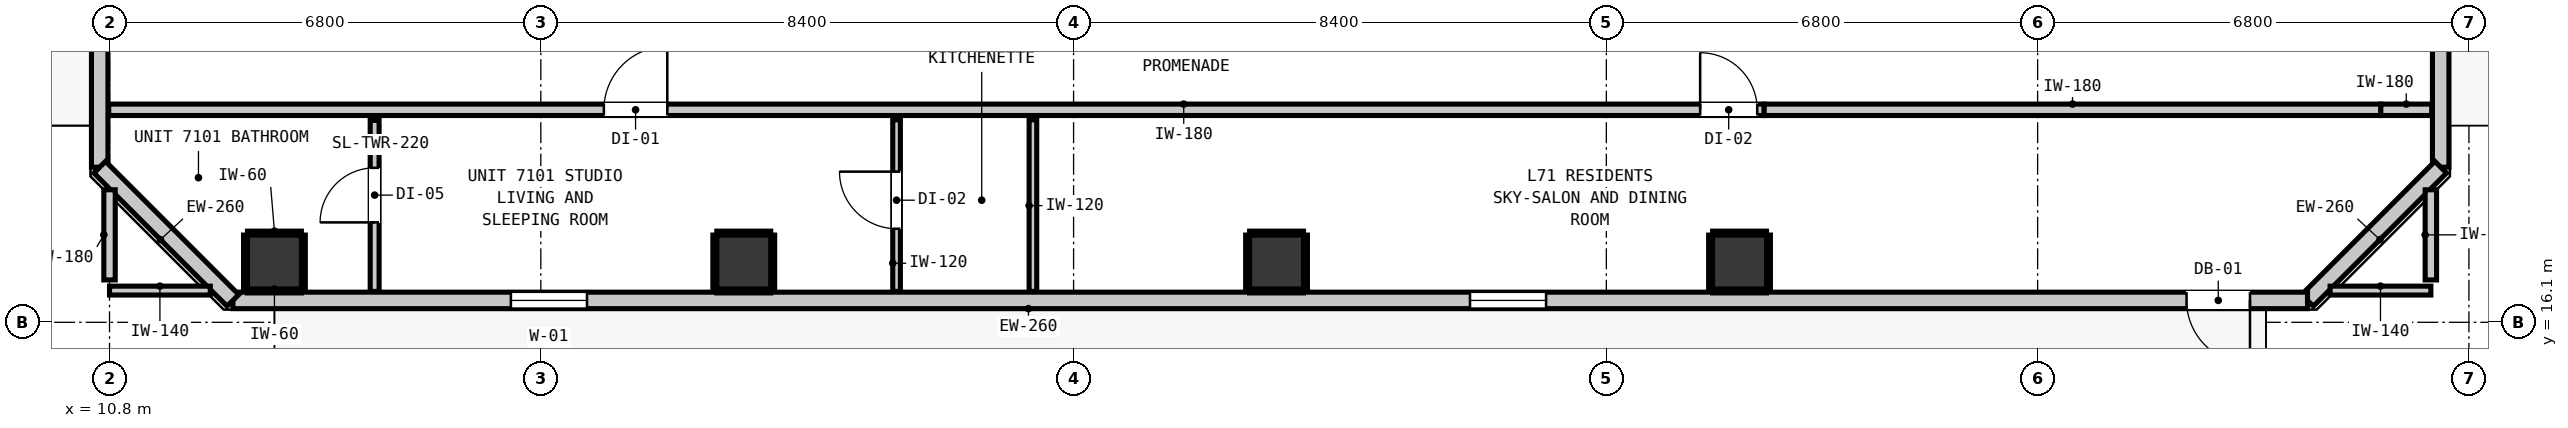
"""IFC4 building model, lengths in metres.
Left out: names, types, materials, properties, quantities, classifications, styles, units other than length and angle.
Written with IfcOpenShell. Run it as: python <this file> out.ifc"""

import sys

from ifc_helpers import new_model, si_unit, direction, frame, frame_2d, origin, origin_2d, place, context, subcontext, project, spatial, rectangle, extrude, element, fill, save


model = new_model("IFC4")
c1 = context("Model", 3, precision=1e-05, world=origin(), true_north=direction((0.0, 1.0)))
c2 = subcontext(c1, "Body", "Model", "MODEL_VIEW")
j1 = project(units=[si_unit("LENGTHUNIT", "METRE"), si_unit("PLANEANGLEUNIT", "RADIAN")], contexts=[c1])
p1 = place(None, origin())
s1 = spatial("IfcSite", under=j1, at=p1, CompositionType="ELEMENT")
p2 = place(p1, origin())
s2 = spatial("IfcBuilding", under=s1, at=p2, CompositionType="ELEMENT")
p3 = place(p2, frame((0.0, 0.0, 244.56)))
s3 = spatial("IfcBuildingStorey", under=s2, at=p3, CompositionType="ELEMENT", Elevation=244.56)
for number, where, z_axis, x_axis in (
    (1, (13.4, 17.05, 0.0), (0.0, 0.0, 1.0), (1.0, 0.0, 0.0)),
    (2, (20.8, 17.05, 0.0), (0.0, 0.0, 1.0), (1.0, 0.0, 0.0)),
    (3, (29.2, 17.05, 0.0), (0.0, 0.0, 1.0), (1.0, 0.0, 0.0)),
    (4, (36.5, 17.05, 0.0), (0.0, 0.0, 1.0), (1.0, 0.0, 0.0)),
):
    element("IfcColumn", number, at=place(p3, frame(where, z_axis=z_axis, x_axis=x_axis)), inside=s3, PredefinedType="COLUMN", context=c2, shape_type="SweptSolid", body=[
        extrude(rectangle(XDim=0.85, YDim=0.85, at=origin_2d()), origin(), (0.0, 0.0, 1.0), 3.32),
    ])
p4 = place(p3, frame((10.645, 18.545, 0.0), z_axis=(0.0, 0.0, 1.0), x_axis=(0.0, 1.0, 0.0)))
e5 = element("IfcWall", 5, at=p4, inside=s3, PredefinedType="STANDARD", context=c2, shape_type="SweptSolid", body=[
    extrude(rectangle(XDim=30.31, YDim=0.26, at=frame_2d((15.155, 0.0))), origin(), (0.0, 0.0, 1.0), 3.1),
])
p5 = place(p4, frame((24.171, 0.0, 0.0)))
e6 = element("IfcOpeningElement", 6, at=p5, cuts=e5, PredefinedType="OPENING", context=c2, shape_type="SweptSolid", body=[
    extrude(rectangle(XDim=1.0, YDim=2.15, at=frame_2d((0.5, 1.075))), frame((0.0, 0.14, 0.0), z_axis=(0.0, -1.0, 0.0), x_axis=(1.0, 0.0, 0.0)), (0.0, 0.0, 1.0), 0.28),
])
p6 = place(p4, frame((27.195, 0.0, 0.85)))
e7 = element("IfcOpeningElement", 7, at=p6, cuts=e5, PredefinedType="OPENING", context=c2, shape_type="SweptSolid", body=[
    extrude(rectangle(XDim=1.2, YDim=1.8, at=frame_2d((0.6, 0.9))), frame((0.0, 0.14, 0.0), z_axis=(0.0, -1.0, 0.0), x_axis=(1.0, 0.0, 0.0)), (0.0, 0.0, 1.0), 0.28),
])
p7 = place(p3, frame((47.555, 48.855, 0.0), z_axis=(0.0, 0.0, 1.0), x_axis=(0.0, -1.0, 0.0)))
e8 = element("IfcWall", 8, at=p7, inside=s3, PredefinedType="STANDARD", context=c2, shape_type="SweptSolid", body=[
    extrude(rectangle(XDim=30.31, YDim=0.26, at=frame_2d((15.155, 0.0))), origin(), (0.0, 0.0, 1.0), 3.1),
])
p8 = place(p7, frame((3.729, 0.0, 0.0)))
e9 = element("IfcOpeningElement", 9, at=p8, cuts=e8, PredefinedType="OPENING", context=c2, shape_type="SweptSolid", body=[
    extrude(rectangle(XDim=1.0, YDim=2.15, at=frame_2d((0.5, 1.075))), frame((0.0, 0.14, 0.0), z_axis=(0.0, -1.0, 0.0), x_axis=(1.0, 0.0, 0.0)), (0.0, 0.0, 1.0), 0.28),
])
p9 = place(p3, frame((47.555, 18.545, 0.0), z_axis=(0.0, 0.0, 1.0), x_axis=(-0.707106781187, -0.707106781187, 0.0)))
e10 = element("IfcWall", 10, at=p9, inside=s3, PredefinedType="STANDARD", context=c2, shape_type="SweptSolid", body=[
    extrude(rectangle(XDim=2.97, YDim=0.26, at=frame_2d((1.485, 0.0))), origin(), (0.0, 0.0, 1.0), 3.1),
])
p10 = place(p3, frame((45.455, 16.445, 0.0), z_axis=(0.0, 0.0, 1.0), x_axis=(-1.0, 0.0, 0.0)))
e11 = element("IfcWall", 11, at=p10, inside=s3, PredefinedType="STANDARD", context=c2, shape_type="SweptSolid", body=[
    extrude(rectangle(XDim=32.71, YDim=0.26, at=frame_2d((16.355, 0.0))), origin(), (0.0, 0.0, 1.0), 3.1),
])
p11 = place(p10, frame((0.907, 0.0, 0.0)))
e12 = element("IfcOpeningElement", 12, at=p11, cuts=e11, PredefinedType="OPENING", context=c2, shape_type="SweptSolid", body=[
    extrude(rectangle(XDim=1.0, YDim=2.15, at=frame_2d((0.5, 1.075))), frame((0.0, 0.14, 0.0), z_axis=(0.0, -1.0, 0.0), x_axis=(1.0, 0.0, 0.0)), (0.0, 0.0, 1.0), 0.28),
])
p12 = place(p10, frame((27.127, 0.0, 0.85)))
e13 = element("IfcOpeningElement", 13, at=p12, cuts=e11, PredefinedType="OPENING", context=c2, shape_type="SweptSolid", body=[
    extrude(rectangle(XDim=1.2, YDim=1.8, at=frame_2d((0.6, 0.9))), frame((0.0, 0.14, 0.0), z_axis=(0.0, -1.0, 0.0), x_axis=(1.0, 0.0, 0.0)), (0.0, 0.0, 1.0), 0.28),
])
p13 = place(p10, frame((12.005, 0.0, 0.85)))
e14 = element("IfcOpeningElement", 14, at=p13, cuts=e11, PredefinedType="OPENING", context=c2, shape_type="SweptSolid", body=[
    extrude(rectangle(XDim=1.2, YDim=1.8, at=frame_2d((0.6, 0.9))), frame((0.0, 0.14, 0.0), z_axis=(0.0, -1.0, 0.0), x_axis=(1.0, 0.0, 0.0)), (0.0, 0.0, 1.0), 0.28),
])
p14 = place(p3, frame((12.745, 16.445, 0.0), z_axis=(0.0, 0.0, 1.0), x_axis=(-0.707147883682, 0.707065676302, 0.0)))
e15 = element("IfcWall", 15, at=p14, inside=s3, PredefinedType="STANDARD", context=c2, shape_type="SweptSolid", body=[
    extrude(rectangle(XDim=2.97, YDim=0.26, at=frame_2d((1.485, 0.0))), origin(), (0.0, 0.0, 1.0), 3.1),
])
p15 = place(p3, frame((10.787, 19.45, 0.0), z_axis=(0.0, 0.0, 1.0), x_axis=(1.0, 0.0, 0.0)))
e16 = element("IfcWall", 16, at=p15, inside=s3, PredefinedType="PARTITIONING", context=c2, shape_type="SweptSolid", body=[
    extrude(rectangle(XDim=26.102, YDim=0.18, at=frame_2d((13.051, 0.0))), origin(), (0.0, 0.0, 1.0), 3.1),
])
p16 = place(p15, frame((7.807, 0.0, 0.0)))
e17 = element("IfcOpeningElement", 17, at=p16, cuts=e16, PredefinedType="OPENING", context=c2, shape_type="SweptSolid", body=[
    extrude(rectangle(XDim=1.0, YDim=2.15, at=frame_2d((0.5, 1.075))), frame((0.0, 0.1, 0.0), z_axis=(0.0, -1.0, 0.0), x_axis=(1.0, 0.0, 0.0)), (0.0, 0.0, 1.0), 0.2),
])
p17 = place(p15, frame((25.092, 0.0, 0.0)))
e18 = element("IfcOpeningElement", 18, at=p17, cuts=e16, PredefinedType="OPENING", context=c2, shape_type="SweptSolid", body=[
    extrude(rectangle(XDim=0.9, YDim=2.1, at=frame_2d((0.45, 1.05))), frame((0.0, 0.1, 0.0), z_axis=(0.0, -1.0, 0.0), x_axis=(1.0, 0.0, 0.0)), (0.0, 0.0, 1.0), 0.2),
])
p18 = place(p3, frame((36.889, 19.45, 0.0), z_axis=(0.0, 0.0, 1.0), x_axis=(1.0, 0.0, 0.0)))
e19 = element("IfcWall", 19, at=p18, inside=s3, PredefinedType="PARTITIONING", context=c2, shape_type="SweptSolid", body=[
    extrude(rectangle(XDim=9.722, YDim=0.18, at=frame_2d((4.861, 0.0))), origin(), (0.0, 0.0, 1.0), 2.477),
])
p19 = place(p3, frame((46.611, 19.45, 0.0), z_axis=(0.0, 0.0, 1.0), x_axis=(1.0, 0.0, 0.0)))
e20 = element("IfcWall", 20, at=p19, inside=s3, PredefinedType="PARTITIONING", context=c2, shape_type="SweptSolid", body=[
    extrude(rectangle(XDim=0.802, YDim=0.18, at=frame_2d((0.401, 0.0))), origin(), (0.0, 0.0, 1.0), 3.1),
])
for number, where, z_axis, x_axis in (
    (21, (10.8, 16.6, 0.0), (0.0, 0.0, 1.0), (1.0, 0.0, 0.0)),
    (22, (45.811, 16.6, 0.0), (0.0, 0.0, 1.0), (1.0, 0.0, 0.0)),
):
    element("IfcWall", number, at=place(p3, frame(where, z_axis=z_axis, x_axis=x_axis)), inside=s3, PredefinedType="PARTITIONING", context=c2, shape_type="SweptSolid", body=[
        extrude(rectangle(XDim=1.589, YDim=0.14, at=frame_2d((0.794, 0.0))), origin(), (0.0, 0.0, 1.0), 3.1),
    ])
for number, where, z_axis, x_axis in (
    (23, (10.8, 16.768, 0.0), (0.0, 0.0, 1.0), (0.0, 1.0, 0.0)),
    (24, (47.4, 16.768, 0.0), (0.0, 0.0, 1.0), (0.0, 1.0, 0.0)),
):
    element("IfcWall", number, at=place(p3, frame(where, z_axis=z_axis, x_axis=x_axis)), inside=s3, PredefinedType="PARTITIONING", context=c2, shape_type="SweptSolid", body=[
        extrude(rectangle(XDim=1.421, YDim=0.18, at=frame_2d((0.71, 0.0))), origin(), (0.0, 0.0, 1.0), 3.1),
    ])
p20 = place(p3, frame((14.98, 16.587, 0.0), z_axis=(0.0, 0.0, 1.0), x_axis=(0.0, 1.0, 0.0)))
e25 = element("IfcWall", 25, at=p20, inside=s3, PredefinedType="PARTITIONING", context=c2, shape_type="SweptSolid", body=[
    extrude(rectangle(XDim=2.695, YDim=0.14, at=frame_2d((1.348, 0.0))), origin(), (0.0, 0.0, 1.0), 3.1),
])
p21 = place(p20, frame((1.088, 0.0, 0.0)))
e26 = element("IfcOpeningElement", 26, at=p21, cuts=e25, PredefinedType="OPENING", context=c2, shape_type="SweptSolid", body=[
    extrude(rectangle(XDim=0.86, YDim=2.02, at=frame_2d((0.43, 1.01))), frame((0.0, 0.08, 0.0), z_axis=(0.0, -1.0, 0.0), x_axis=(1.0, 0.0, 0.0)), (0.0, 0.0, 1.0), 0.16),
])
p22 = place(p3, frame((23.209, 16.587, 0.0), z_axis=(0.0, 0.0, 1.0), x_axis=(0.0, 1.0, 0.0)))
e27 = element("IfcWall", 27, at=p22, inside=s3, PredefinedType="PARTITIONING", context=c2, shape_type="SweptSolid", body=[
    extrude(rectangle(XDim=2.705, YDim=0.12, at=frame_2d((1.353, 0.0))), origin(), (0.0, 0.0, 1.0), 3.1),
])
p23 = place(p22, frame((0.988, 0.0, 0.0)))
e28 = element("IfcOpeningElement", 28, at=p23, cuts=e27, PredefinedType="OPENING", context=c2, shape_type="SweptSolid", body=[
    extrude(rectangle(XDim=0.9, YDim=2.1, at=frame_2d((0.45, 1.05))), frame((0.0, 0.07, 0.0), z_axis=(0.0, -1.0, 0.0), x_axis=(1.0, 0.0, 0.0)), (0.0, 0.0, 1.0), 0.14),
])
p24 = place(p3, frame((25.359, 16.587, 0.0), z_axis=(0.0, 0.0, 1.0), x_axis=(0.0, 1.0, 0.0)))
e29 = element("IfcWall", 29, at=p24, inside=s3, PredefinedType="PARTITIONING", context=c2, shape_type="SweptSolid", body=[
    extrude(rectangle(XDim=2.705, YDim=0.12, at=frame_2d((1.353, 0.0))), origin(), (0.0, 0.0, 1.0), 3.1),
])
for number, where, z_axis, x_axis in (
    (30, (12.975, 16.593, 0.0), (0.0, 0.0, 1.0), (1.0, 0.0, 0.0)),
    (31, (12.975, 17.507, 0.0), (0.0, 0.0, 1.0), (1.0, 0.0, 0.0)),
):
    element("IfcWall", number, at=place(p3, frame(where, z_axis=z_axis, x_axis=x_axis)), inside=s3, PredefinedType="PARTITIONING", context=c2, shape_type="SweptSolid", body=[
        extrude(rectangle(XDim=0.85, YDim=0.06, at=frame_2d((0.425, 0.0))), origin(), (0.0, 0.0, 1.0), 1.45),
    ])
for number, where, z_axis, x_axis in (
    (32, (12.943, 16.625, 0.0), (0.0, 0.0, 1.0), (0.0, 1.0, 0.0)),
    (33, (13.857, 16.625, 0.0), (0.0, 0.0, 1.0), (0.0, 1.0, 0.0)),
    (34, (20.375, 16.593, 0.0), (0.0, 0.0, 1.0), (1.0, 0.0, 0.0)),
    (35, (20.375, 17.507, 0.0), (0.0, 0.0, 1.0), (1.0, 0.0, 0.0)),
    (36, (20.343, 16.625, 0.0), (0.0, 0.0, 1.0), (0.0, 1.0, 0.0)),
    (37, (21.257, 16.625, 0.0), (0.0, 0.0, 1.0), (0.0, 1.0, 0.0)),
    (38, (28.775, 16.593, 0.0), (0.0, 0.0, 1.0), (1.0, 0.0, 0.0)),
    (39, (28.775, 17.507, 0.0), (0.0, 0.0, 1.0), (1.0, 0.0, 0.0)),
    (40, (28.743, 16.625, 0.0), (0.0, 0.0, 1.0), (0.0, 1.0, 0.0)),
    (41, (29.657, 16.625, 0.0), (0.0, 0.0, 1.0), (0.0, 1.0, 0.0)),
    (42, (36.075, 16.593, 0.0), (0.0, 0.0, 1.0), (1.0, 0.0, 0.0)),
    (43, (36.075, 17.507, 0.0), (0.0, 0.0, 1.0), (1.0, 0.0, 0.0)),
    (44, (36.043, 16.625, 0.0), (0.0, 0.0, 1.0), (0.0, 1.0, 0.0)),
    (45, (36.957, 16.625, 0.0), (0.0, 0.0, 1.0), (0.0, 1.0, 0.0)),
):
    element("IfcWall", number, at=place(p3, frame(where, z_axis=z_axis, x_axis=x_axis)), inside=s3, PredefinedType="PARTITIONING", context=c2, shape_type="SweptSolid", body=[
        extrude(rectangle(XDim=0.85, YDim=0.06, at=frame_2d((0.425, 0.0))), origin(), (0.0, 0.0, 1.0), 1.45),
    ])
p25 = place(p11, origin())
e46 = element("IfcDoor", 46, at=p25, inside=s3, OperationType="SINGLE_SWING_LEFT", PredefinedType="DOOR", context=c2, shape_type="SweptSolid", body=[
    extrude(rectangle(XDim=1.0, YDim=2.15, at=frame_2d((0.5, 1.075))), frame((0.0, 0.025, 0.0), z_axis=(0.0, -1.0, 0.0), x_axis=(1.0, 0.0, 0.0)), (0.0, 0.0, 1.0), 0.05),
])
fill(e12, e46)
p26 = place(p12, origin())
e47 = element("IfcWindow", 47, at=p26, inside=s3, PartitioningType="SINGLE_PANEL", PredefinedType="WINDOW", context=c2, shape_type="SweptSolid", body=[
    extrude(rectangle(XDim=1.2, YDim=1.8, at=frame_2d((0.6, 0.9))), frame((0.0, 0.03, 0.0), z_axis=(0.0, -1.0, 0.0), x_axis=(1.0, 0.0, 0.0)), (0.0, 0.0, 1.0), 0.06),
])
fill(e13, e47)
p27 = place(p13, origin())
e48 = element("IfcWindow", 48, at=p27, inside=s3, PartitioningType="SINGLE_PANEL", PredefinedType="WINDOW", context=c2, shape_type="SweptSolid", body=[
    extrude(rectangle(XDim=1.2, YDim=1.8, at=frame_2d((0.6, 0.9))), frame((0.0, 0.03, 0.0), z_axis=(0.0, -1.0, 0.0), x_axis=(1.0, 0.0, 0.0)), (0.0, 0.0, 1.0), 0.06),
])
fill(e14, e48)
p28 = place(p16, origin())
e49 = element("IfcDoor", 49, at=p28, inside=s3, OperationType="SINGLE_SWING_RIGHT", PredefinedType="DOOR", context=c2, shape_type="SweptSolid", body=[
    extrude(rectangle(XDim=1.0, YDim=2.15, at=frame_2d((0.5, 1.075))), frame((0.0, 0.025, 0.0), z_axis=(0.0, -1.0, 0.0), x_axis=(1.0, 0.0, 0.0)), (0.0, 0.0, 1.0), 0.05),
])
fill(e17, e49)
p29 = place(p21, origin())
e50 = element("IfcDoor", 50, at=p29, inside=s3, OperationType="SINGLE_SWING_LEFT", PredefinedType="DOOR", context=c2, shape_type="SweptSolid", body=[
    extrude(rectangle(XDim=0.86, YDim=2.02, at=frame_2d((0.43, 1.01))), frame((0.0, 0.025, 0.0), z_axis=(0.0, -1.0, 0.0), x_axis=(1.0, 0.0, 0.0)), (0.0, 0.0, 1.0), 0.05),
])
fill(e26, e50)
p30 = place(p23, origin())
e51 = element("IfcDoor", 51, at=p30, inside=s3, OperationType="SINGLE_SWING_RIGHT", PredefinedType="DOOR", context=c2, shape_type="SweptSolid", body=[
    extrude(rectangle(XDim=0.9, YDim=2.1, at=frame_2d((0.45, 1.05))), frame((0.0, 0.025, 0.0), z_axis=(0.0, -1.0, 0.0), x_axis=(1.0, 0.0, 0.0)), (0.0, 0.0, 1.0), 0.05),
])
fill(e28, e51)
p31 = place(p17, origin())
e52 = element("IfcDoor", 52, at=p31, inside=s3, OperationType="SINGLE_SWING_LEFT", PredefinedType="DOOR", context=c2, shape_type="SweptSolid", body=[
    extrude(rectangle(XDim=0.9, YDim=2.1, at=frame_2d((0.45, 1.05))), frame((0.0, 0.025, 0.0), z_axis=(0.0, -1.0, 0.0), x_axis=(1.0, 0.0, 0.0)), (0.0, 0.0, 1.0), 0.05),
])
fill(e18, e52)
save(model, sys.argv[1])
